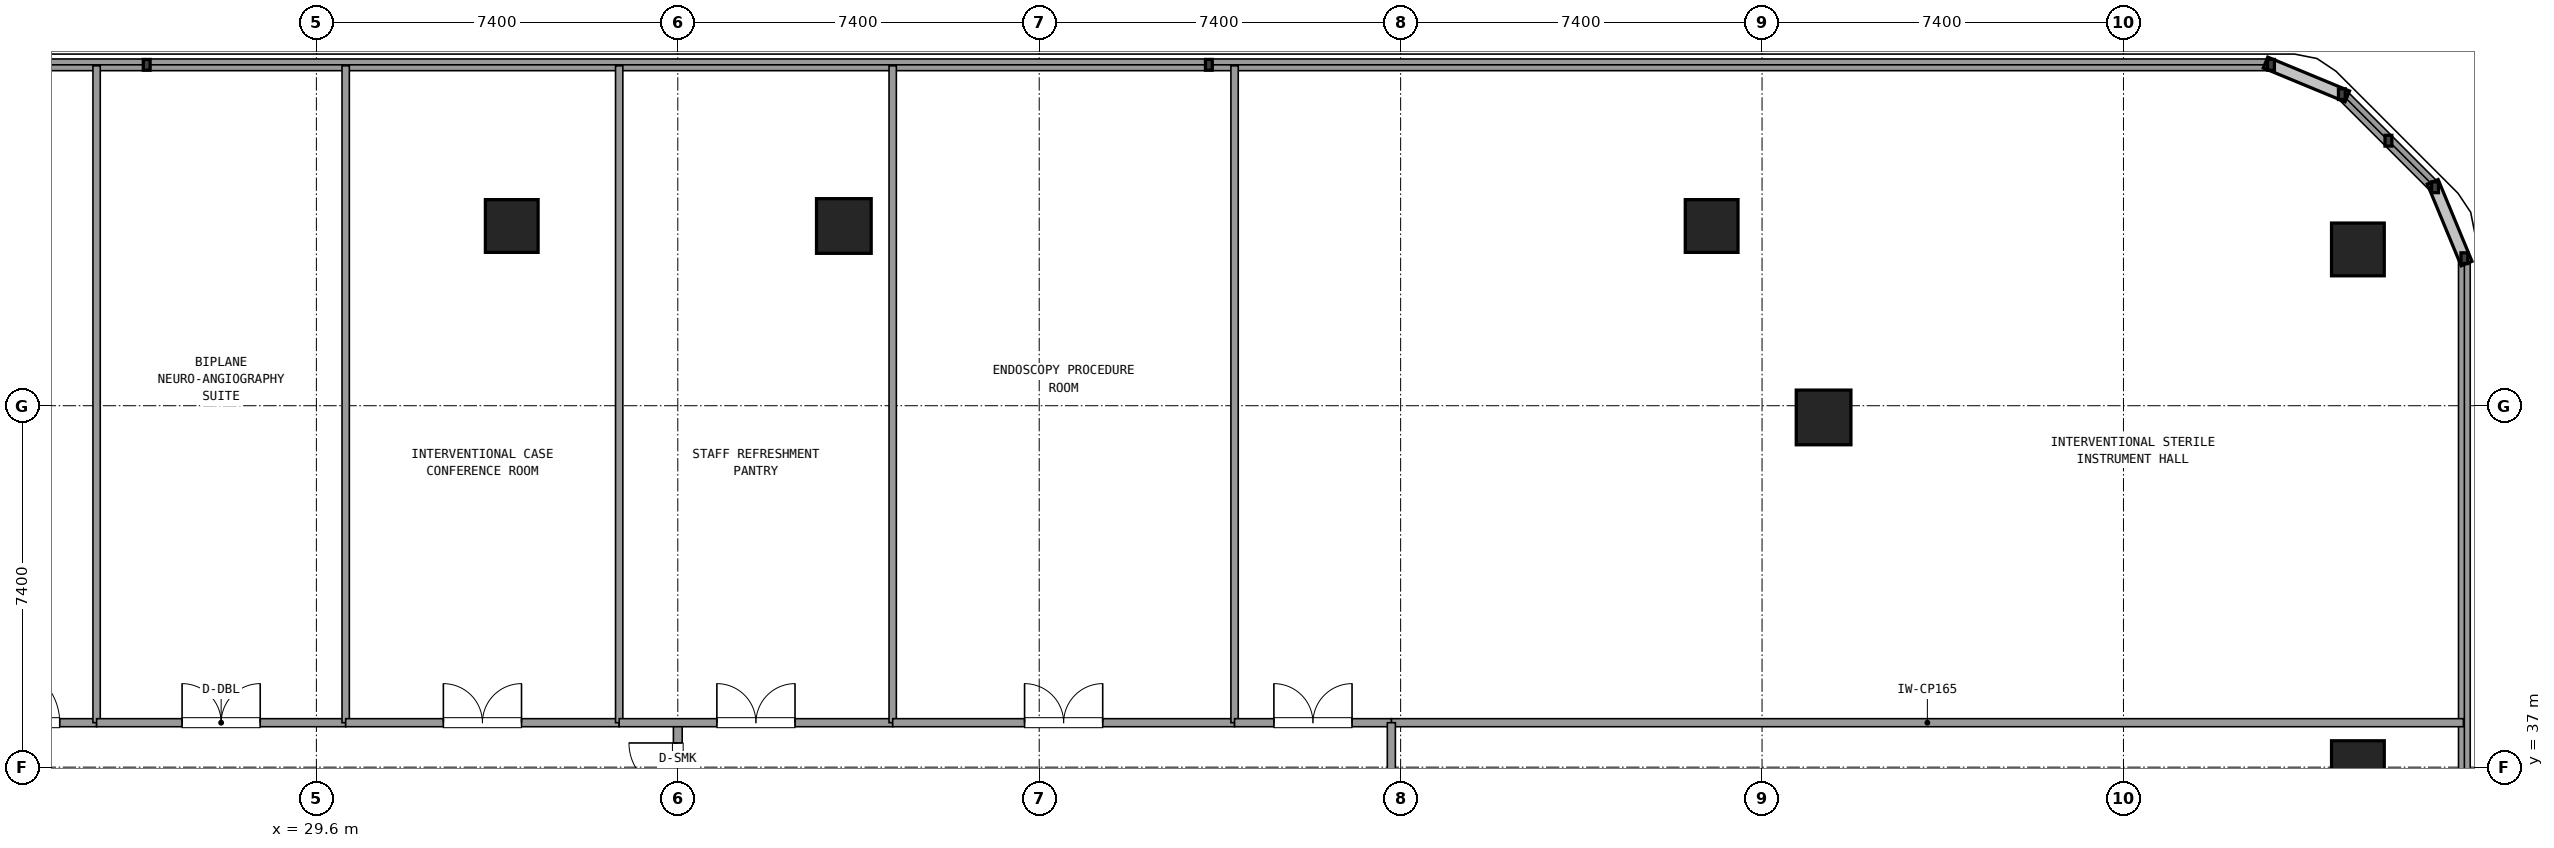
"""IFC4 building model, lengths in metres.
Left out: names, types, materials, properties, quantities, classifications, styles, units other than length and angle.
Written with IfcOpenShell. Run it as: python <this file> out.ifc"""

import sys

from ifc_helpers import new_model, si_unit, direction, frame, frame_2d, origin, origin_2d, place, context, subcontext, project, spatial, rectangle, circle, extrude, element, fill, save


model = new_model("IFC4")
c1 = context("Model", 3, precision=1e-05, world=origin(), true_north=direction((0.0, 1.0)))
c2 = subcontext(c1, "Body", "Model", "MODEL_VIEW")
j1 = project(units=[si_unit("LENGTHUNIT", "METRE"), si_unit("PLANEANGLEUNIT", "RADIAN")], contexts=[c1])
p1 = place(None, origin())
s1 = spatial("IfcSite", under=j1, at=p1, CompositionType="ELEMENT")
p2 = place(p1, origin())
s2 = spatial("IfcBuilding", under=s1, at=p2, CompositionType="ELEMENT")
p3 = place(p2, frame((0.0, 0.0, 14.4)))
s3 = spatial("IfcBuildingStorey", under=s2, at=p3, CompositionType="ELEMENT", Elevation=14.4)
p4 = place(p3, frame((60.46, 44.16, 0.0), z_axis=(0.0, 0.0, 1.0), x_axis=(1.0, 0.0, 0.0)))
e1 = element("IfcColumn", 1, at=p4, inside=s3, PredefinedType="COLUMN", context=c2, shape_type="SweptSolid", body=[
    extrude(circle(Radius=0.56, at=origin_2d()), origin(), (0.0, 0.0, 1.0), 4.5),
])
p5 = place(p3, frame((58.168, 48.08, 0.0), z_axis=(0.0, 0.0, 1.0), x_axis=(1.0, 0.0, 0.0)))
e2 = element("IfcColumn", 2, at=p5, inside=s3, PredefinedType="COLUMN", context=c2, shape_type="SweptSolid", body=[
    extrude(rectangle(XDim=1.08, YDim=1.08, at=origin_2d()), origin(), (0.0, 0.0, 1.0), 4.5),
])
p6 = place(p3, frame((40.4, 48.08, 0.0), z_axis=(0.0, 0.0, 1.0), x_axis=(1.0, 0.0, 0.0)))
e3 = element("IfcColumn", 3, at=p6, inside=s3, PredefinedType="COLUMN", context=c2, shape_type="SweptSolid", body=[
    extrude(circle(Radius=0.56, at=origin_2d()), origin(), (0.0, 0.0, 1.0), 4.5),
])
for number, where, z_axis, x_axis in (
    (4, (33.6, 48.08, 0.0), (0.0, 0.0, 1.0), (1.0, 0.0, 0.0)),
    (5, (71.4, 37.0, 0.0), (0.0, 0.0, 1.0), (1.0, 0.0, 0.0)),
    (6, (71.4, 47.6, 0.0), (0.0, 0.0, 1.0), (1.0, 0.0, 0.0)),
):
    element("IfcColumn", number, at=place(p3, frame(where, z_axis=z_axis, x_axis=x_axis)), inside=s3, PredefinedType="COLUMN", context=c2, shape_type="SweptSolid", body=[
        extrude(rectangle(XDim=1.08, YDim=1.08, at=origin_2d()), origin(), (0.0, 0.0, 1.0), 4.5),
    ])
p7 = place(p3, frame((73.58, 4.379, 0.0), z_axis=(0.0, 0.0, 1.0), x_axis=(0.0, 1.0, 0.0)))
e7 = element("IfcWall", 7, at=p7, inside=s3, PredefinedType="SOLIDWALL", context=c2, shape_type="SweptSolid", body=[
    extrude(rectangle(XDim=43.042, YDim=0.24, at=frame_2d((21.521, 0.0))), origin(), (0.0, 0.0, 1.0), 0.85),
])
p8 = place(p3, frame((72.979, 48.872, 0.0), z_axis=(0.0, 0.0, 1.0), x_axis=(-0.707106781187, 0.707106781187, 0.0)))
e8 = element("IfcWall", 8, at=p8, inside=s3, PredefinedType="SOLIDWALL", context=c2, shape_type="SweptSolid", body=[
    extrude(rectangle(XDim=2.697, YDim=0.24, at=frame_2d((1.348, 0.0))), origin(), (0.0, 0.0, 1.0), 0.85),
])
p9 = place(p3, frame((69.621, 51.38, 0.0), z_axis=(0.0, 0.0, 1.0), x_axis=(-1.0, 0.0, 0.0)))
e9 = element("IfcWall", 9, at=p9, inside=s3, PredefinedType="SOLIDWALL", context=c2, shape_type="SweptSolid", body=[
    extrude(rectangle(XDim=65.242, YDim=0.24, at=frame_2d((32.621, 0.0))), origin(), (0.0, 0.0, 1.0), 0.85),
])
p10 = place(p3, frame((37.0, 35.08, 0.0), z_axis=(0.0, 0.0, 1.0), x_axis=(0.0, 1.0, 0.0)))
e10 = element("IfcWall", 10, at=p10, inside=s3, PredefinedType="PARTITIONING", context=c2, shape_type="SweptSolid", body=[
    extrude(rectangle(XDim=2.83, YDim=0.18, at=frame_2d((1.415, 0.0))), origin(), (0.0, 0.0, 1.0), 3.21),
])
p11 = place(p10, frame((0.415, 0.0, 0.0)))
e11 = element("IfcOpeningElement", 11, at=p11, cuts=e10, PredefinedType="OPENING", context=c2, shape_type="SweptSolid", body=[
    extrude(rectangle(XDim=2.0, YDim=2.2, at=frame_2d((1.0, 1.1))), frame((0.0, 0.1, 0.0), z_axis=(0.0, -1.0, 0.0), x_axis=(1.0, 0.0, 0.0)), (0.0, 0.0, 1.0), 0.2),
])
p12 = place(p3, frame((51.61, 37.91, 0.0), z_axis=(0.0, 0.0, 1.0), x_axis=(1.0, 0.0, 0.0)))
e12 = element("IfcWall", 12, at=p12, inside=s3, PredefinedType="PARTITIONING", context=c2, shape_type="SweptSolid", body=[
    extrude(rectangle(XDim=21.95, YDim=0.165, at=frame_2d((10.975, 0.0))), origin(), (0.0, 0.0, 1.0), 3.21),
])
p13 = place(p3, frame((22.39, 37.91, 0.0), z_axis=(0.0, 0.0, 1.0), x_axis=(1.0, 0.0, 0.0)))
e13 = element("IfcWall", 13, at=p13, inside=s3, PredefinedType="PARTITIONING", context=c2, shape_type="SweptSolid", body=[
    extrude(rectangle(XDim=2.71, YDim=0.165, at=frame_2d((1.355, 0.0))), origin(), (0.0, 0.0, 1.0), 3.21),
])
p14 = place(p13, frame((0.755, 0.0, 0.0)))
e14 = element("IfcOpeningElement", 14, at=p14, cuts=e13, PredefinedType="OPENING", context=c2, shape_type="SweptSolid", body=[
    extrude(rectangle(XDim=1.2, YDim=2.15, at=frame_2d((0.6, 1.075))), frame((0.0, 0.093, 0.0), z_axis=(0.0, -1.0, 0.0), x_axis=(1.0, 0.0, 0.0)), (0.0, 0.0, 1.0), 0.185),
])
p15 = place(p3, frame((25.1, 37.91, 0.0), z_axis=(0.0, 0.0, 1.0), x_axis=(0.0, 1.0, 0.0)))
e15 = element("IfcWall", 15, at=p15, inside=s3, PredefinedType="PARTITIONING", context=c2, shape_type="SweptSolid", body=[
    extrude(rectangle(XDim=13.45, YDim=0.15, at=frame_2d((6.725, 0.0))), origin(), (0.0, 0.0, 1.0), 3.21),
])
p16 = place(p3, frame((25.1, 37.91, 0.0), z_axis=(0.0, 0.0, 1.0), x_axis=(1.0, 0.0, 0.0)))
e16 = element("IfcWall", 16, at=p16, inside=s3, PredefinedType="PARTITIONING", context=c2, shape_type="SweptSolid", body=[
    extrude(rectangle(XDim=5.1, YDim=0.165, at=frame_2d((2.55, 0.0))), origin(), (0.0, 0.0, 1.0), 3.21),
])
p17 = place(p16, frame((1.75, 0.0, 0.0)))
e17 = element("IfcOpeningElement", 17, at=p17, cuts=e16, PredefinedType="OPENING", context=c2, shape_type="SweptSolid", body=[
    extrude(rectangle(XDim=1.6, YDim=2.2, at=frame_2d((0.8, 1.1))), frame((0.0, 0.093, 0.0), z_axis=(0.0, -1.0, 0.0), x_axis=(1.0, 0.0, 0.0)), (0.0, 0.0, 1.0), 0.185),
])
p18 = place(p3, frame((30.2, 37.91, 0.0), z_axis=(0.0, 0.0, 1.0), x_axis=(0.0, 1.0, 0.0)))
e18 = element("IfcWall", 18, at=p18, inside=s3, PredefinedType="PARTITIONING", context=c2, shape_type="SweptSolid", body=[
    extrude(rectangle(XDim=13.45, YDim=0.15, at=frame_2d((6.725, 0.0))), origin(), (0.0, 0.0, 1.0), 3.21),
])
p19 = place(p3, frame((30.2, 37.91, 0.0), z_axis=(0.0, 0.0, 1.0), x_axis=(1.0, 0.0, 0.0)))
e19 = element("IfcWall", 19, at=p19, inside=s3, PredefinedType="PARTITIONING", context=c2, shape_type="SweptSolid", body=[
    extrude(rectangle(XDim=5.6, YDim=0.165, at=frame_2d((2.8, 0.0))), origin(), (0.0, 0.0, 1.0), 3.21),
])
p20 = place(p19, frame((2.0, 0.0, 0.0)))
e20 = element("IfcOpeningElement", 20, at=p20, cuts=e19, PredefinedType="OPENING", context=c2, shape_type="SweptSolid", body=[
    extrude(rectangle(XDim=1.6, YDim=2.2, at=frame_2d((0.8, 1.1))), frame((0.0, 0.093, 0.0), z_axis=(0.0, -1.0, 0.0), x_axis=(1.0, 0.0, 0.0)), (0.0, 0.0, 1.0), 0.185),
])
p21 = place(p3, frame((35.8, 37.91, 0.0), z_axis=(0.0, 0.0, 1.0), x_axis=(0.0, 1.0, 0.0)))
e21 = element("IfcWall", 21, at=p21, inside=s3, PredefinedType="PARTITIONING", context=c2, shape_type="SweptSolid", body=[
    extrude(rectangle(XDim=13.45, YDim=0.15, at=frame_2d((6.725, 0.0))), origin(), (0.0, 0.0, 1.0), 3.21),
])
p22 = place(p3, frame((35.8, 37.91, 0.0), z_axis=(0.0, 0.0, 1.0), x_axis=(1.0, 0.0, 0.0)))
e22 = element("IfcWall", 22, at=p22, inside=s3, PredefinedType="PARTITIONING", context=c2, shape_type="SweptSolid", body=[
    extrude(rectangle(XDim=5.6, YDim=0.165, at=frame_2d((2.8, 0.0))), origin(), (0.0, 0.0, 1.0), 3.21),
])
p23 = place(p22, frame((2.0, 0.0, 0.0)))
e23 = element("IfcOpeningElement", 23, at=p23, cuts=e22, PredefinedType="OPENING", context=c2, shape_type="SweptSolid", body=[
    extrude(rectangle(XDim=1.6, YDim=2.2, at=frame_2d((0.8, 1.1))), frame((0.0, 0.093, 0.0), z_axis=(0.0, -1.0, 0.0), x_axis=(1.0, 0.0, 0.0)), (0.0, 0.0, 1.0), 0.185),
])
p24 = place(p3, frame((41.4, 37.91, 0.0), z_axis=(0.0, 0.0, 1.0), x_axis=(0.0, 1.0, 0.0)))
e24 = element("IfcWall", 24, at=p24, inside=s3, PredefinedType="PARTITIONING", context=c2, shape_type="SweptSolid", body=[
    extrude(rectangle(XDim=13.45, YDim=0.15, at=frame_2d((6.725, 0.0))), origin(), (0.0, 0.0, 1.0), 3.21),
])
p25 = place(p3, frame((41.4, 37.91, 0.0), z_axis=(0.0, 0.0, 1.0), x_axis=(1.0, 0.0, 0.0)))
e25 = element("IfcWall", 25, at=p25, inside=s3, PredefinedType="PARTITIONING", context=c2, shape_type="SweptSolid", body=[
    extrude(rectangle(XDim=7.0, YDim=0.165, at=frame_2d((3.5, 0.0))), origin(), (0.0, 0.0, 1.0), 3.21),
])
p26 = place(p25, frame((2.7, 0.0, 0.0)))
e26 = element("IfcOpeningElement", 26, at=p26, cuts=e25, PredefinedType="OPENING", context=c2, shape_type="SweptSolid", body=[
    extrude(rectangle(XDim=1.6, YDim=2.2, at=frame_2d((0.8, 1.1))), frame((0.0, 0.093, 0.0), z_axis=(0.0, -1.0, 0.0), x_axis=(1.0, 0.0, 0.0)), (0.0, 0.0, 1.0), 0.185),
])
p27 = place(p3, frame((48.4, 37.91, 0.0), z_axis=(0.0, 0.0, 1.0), x_axis=(0.0, 1.0, 0.0)))
e27 = element("IfcWall", 27, at=p27, inside=s3, PredefinedType="PARTITIONING", context=c2, shape_type="SweptSolid", body=[
    extrude(rectangle(XDim=13.45, YDim=0.15, at=frame_2d((6.725, 0.0))), origin(), (0.0, 0.0, 1.0), 3.21),
])
p28 = place(p3, frame((48.4, 37.91, 0.0), z_axis=(0.0, 0.0, 1.0), x_axis=(1.0, 0.0, 0.0)))
e28 = element("IfcWall", 28, at=p28, inside=s3, PredefinedType="PARTITIONING", context=c2, shape_type="SweptSolid", body=[
    extrude(rectangle(XDim=3.21, YDim=0.165, at=frame_2d((1.605, 0.0))), origin(), (0.0, 0.0, 1.0), 3.21),
])
p29 = place(p28, frame((0.805, 0.0, 0.0)))
e29 = element("IfcOpeningElement", 29, at=p29, cuts=e28, PredefinedType="OPENING", context=c2, shape_type="SweptSolid", body=[
    extrude(rectangle(XDim=1.6, YDim=2.2, at=frame_2d((0.8, 1.1))), frame((0.0, 0.093, 0.0), z_axis=(0.0, -1.0, 0.0), x_axis=(1.0, 0.0, 0.0)), (0.0, 0.0, 1.0), 0.185),
])
p30 = place(p3, frame((51.61, 32.3, 0.0), z_axis=(0.0, 0.0, 1.0), x_axis=(0.0, 1.0, 0.0)))
e30 = element("IfcWall", 30, at=p30, inside=s3, PredefinedType="PARTITIONING", context=c2, shape_type="SweptSolid", body=[
    extrude(rectangle(XDim=5.61, YDim=0.165, at=frame_2d((2.805, 0.0))), origin(), (0.0, 0.0, 1.0), 3.21),
])
p31 = place(p30, frame((2.005, 0.0, 0.0)))
e31 = element("IfcOpeningElement", 31, at=p31, cuts=e30, PredefinedType="OPENING", context=c2, shape_type="SweptSolid", body=[
    extrude(rectangle(XDim=1.6, YDim=2.2, at=frame_2d((0.8, 1.1))), frame((0.0, 0.093, 0.0), z_axis=(0.0, -1.0, 0.0), x_axis=(1.0, 0.0, 0.0)), (0.0, 0.0, 1.0), 0.185),
])
p32 = place(p11, origin())
e32 = element("IfcDoor", 32, at=p32, inside=s3, OperationType="DOUBLE_DOOR_SINGLE_SWING", PredefinedType="DOOR", context=c2, shape_type="SweptSolid", body=[
    extrude(rectangle(XDim=2.0, YDim=2.2, at=frame_2d((1.0, 1.1))), frame((0.0, 0.025, 0.0), z_axis=(0.0, -1.0, 0.0), x_axis=(1.0, 0.0, 0.0)), (0.0, 0.0, 1.0), 0.05),
])
fill(e11, e32)
p33 = place(p14, origin())
e33 = element("IfcDoor", 33, at=p33, inside=s3, OperationType="SINGLE_SWING_LEFT", PredefinedType="DOOR", context=c2, shape_type="SweptSolid", body=[
    extrude(rectangle(XDim=1.2, YDim=2.15, at=frame_2d((0.6, 1.075))), frame((0.0, 0.025, 0.0), z_axis=(0.0, -1.0, 0.0), x_axis=(1.0, 0.0, 0.0)), (0.0, 0.0, 1.0), 0.05),
])
fill(e14, e33)
p34 = place(p17, origin())
e34 = element("IfcDoor", 34, at=p34, inside=s3, OperationType="DOUBLE_DOOR_SINGLE_SWING", PredefinedType="DOOR", context=c2, shape_type="SweptSolid", body=[
    extrude(rectangle(XDim=1.6, YDim=2.2, at=frame_2d((0.8, 1.1))), frame((0.0, 0.025, 0.0), z_axis=(0.0, -1.0, 0.0), x_axis=(1.0, 0.0, 0.0)), (0.0, 0.0, 1.0), 0.05),
])
fill(e17, e34)
p35 = place(p20, origin())
e35 = element("IfcDoor", 35, at=p35, inside=s3, OperationType="DOUBLE_DOOR_SINGLE_SWING", PredefinedType="DOOR", context=c2, shape_type="SweptSolid", body=[
    extrude(rectangle(XDim=1.6, YDim=2.2, at=frame_2d((0.8, 1.1))), frame((0.0, 0.025, 0.0), z_axis=(0.0, -1.0, 0.0), x_axis=(1.0, 0.0, 0.0)), (0.0, 0.0, 1.0), 0.05),
])
fill(e20, e35)
p36 = place(p23, origin())
e36 = element("IfcDoor", 36, at=p36, inside=s3, OperationType="DOUBLE_DOOR_SINGLE_SWING", PredefinedType="DOOR", context=c2, shape_type="SweptSolid", body=[
    extrude(rectangle(XDim=1.6, YDim=2.2, at=frame_2d((0.8, 1.1))), frame((0.0, 0.025, 0.0), z_axis=(0.0, -1.0, 0.0), x_axis=(1.0, 0.0, 0.0)), (0.0, 0.0, 1.0), 0.05),
])
fill(e23, e36)
p37 = place(p26, origin())
e37 = element("IfcDoor", 37, at=p37, inside=s3, OperationType="DOUBLE_DOOR_SINGLE_SWING", PredefinedType="DOOR", context=c2, shape_type="SweptSolid", body=[
    extrude(rectangle(XDim=1.6, YDim=2.2, at=frame_2d((0.8, 1.1))), frame((0.0, 0.025, 0.0), z_axis=(0.0, -1.0, 0.0), x_axis=(1.0, 0.0, 0.0)), (0.0, 0.0, 1.0), 0.05),
])
fill(e26, e37)
p38 = place(p29, origin())
e38 = element("IfcDoor", 38, at=p38, inside=s3, OperationType="DOUBLE_DOOR_SINGLE_SWING", PredefinedType="DOOR", context=c2, shape_type="SweptSolid", body=[
    extrude(rectangle(XDim=1.6, YDim=2.2, at=frame_2d((0.8, 1.1))), frame((0.0, 0.025, 0.0), z_axis=(0.0, -1.0, 0.0), x_axis=(1.0, 0.0, 0.0)), (0.0, 0.0, 1.0), 0.05),
])
fill(e29, e38)
save(model, sys.argv[1])
